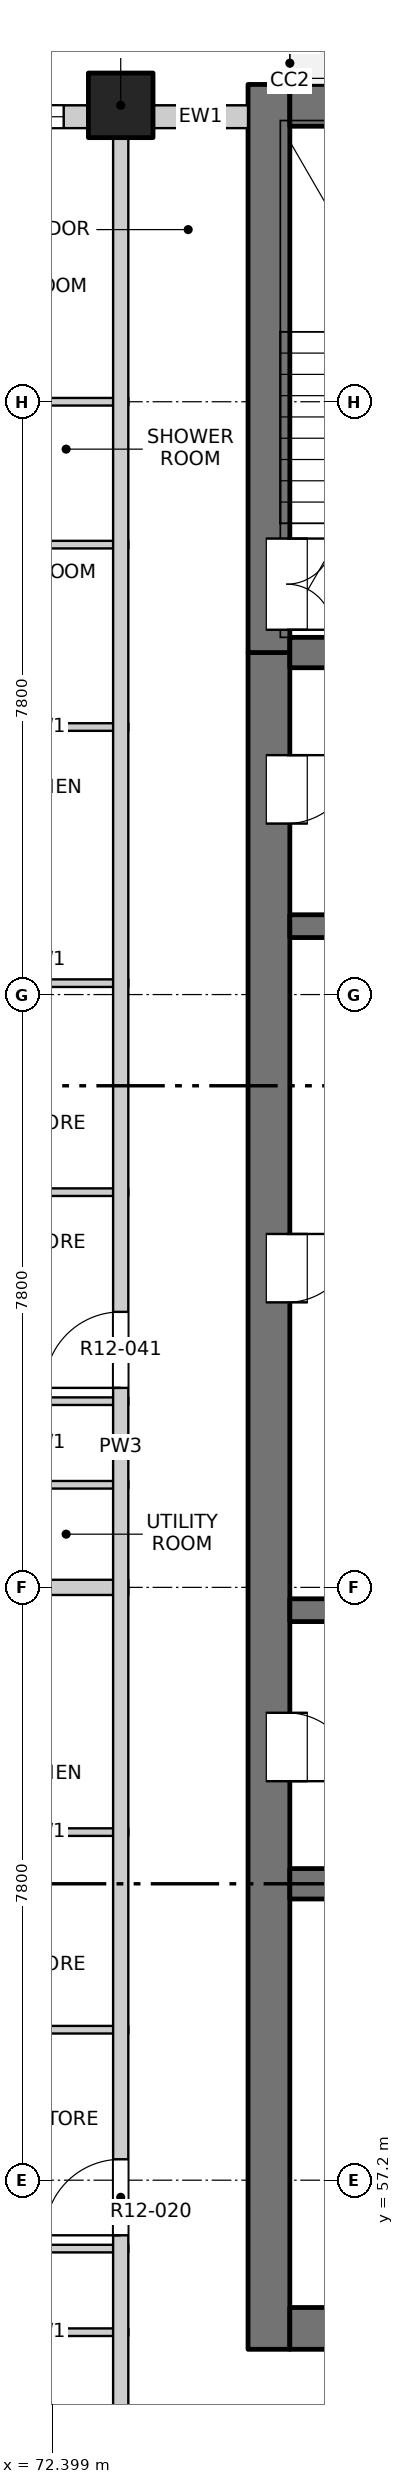
"""IFC4 building model, lengths in metres.
Left out: names, types, materials, properties, quantities, classifications, styles, units other than length and angle.
Written with IfcOpenShell. Run it as: python <this file> out.ifc"""

import sys

from ifc_helpers import new_model, si_unit, direction, frame, frame_2d, origin, origin_2d, place, context, subcontext, project, spatial, rectangle, extrude, element, fill, save


model = new_model("IFC4")
c1 = context("Model", 3, precision=1e-05, world=origin(), true_north=direction((0.0, 1.0)))
c2 = subcontext(c1, "Body", "Model", "MODEL_VIEW")
j1 = project(units=[si_unit("LENGTHUNIT", "METRE"), si_unit("PLANEANGLEUNIT", "RADIAN")], contexts=[c1])
p1 = place(None, origin())
s1 = spatial("IfcSite", under=j1, at=p1, CompositionType="ELEMENT")
p2 = place(p1, origin())
s2 = spatial("IfcBuilding", under=s1, at=p2, CompositionType="ELEMENT")
p3 = place(p2, frame((0.0, 0.0, 137.3)))
s3 = spatial("IfcBuildingStorey", under=s2, at=p3, CompositionType="ELEMENT", Elevation=137.3)
p4 = place(p3, frame((73.3, 84.5, -0.25), z_axis=(0.0, 0.0, 1.0), x_axis=(1.0, 0.0, 0.0)))
e1 = element("IfcColumn", 1, at=p4, inside=s3, PredefinedType="COLUMN", context=c2, shape_type="SweptSolid", body=[
    extrude(rectangle(XDim=0.85, YDim=0.85, at=origin_2d()), origin(), (0.0, 0.0, 1.0), 3.4),
])
p5 = place(p3, frame((75.25, 54.975, -0.25), z_axis=(0.0, 0.0, 1.0), x_axis=(0.0, 1.0, 0.0)))
e2 = element("IfcWall", 2, at=p5, inside=s3, PredefinedType="SOLIDWALL", context=c2, shape_type="SweptSolid", body=[
    extrude(rectangle(XDim=22.325, YDim=0.55, at=frame_2d((11.163, 0.0))), origin(), (0.0, 0.0, 1.0), 3.4),
])
p6 = place(p5, frame((7.475, 0.0, 0.25)))
e3 = element("IfcOpeningElement", 3, at=p6, cuts=e2, PredefinedType="OPENING", context=c2, shape_type="SweptSolid", body=[
    extrude(rectangle(XDim=0.9, YDim=2.1, at=frame_2d((0.45, 1.05))), frame((0.0, 0.285, 0.0), z_axis=(0.0, -1.0, 0.0), x_axis=(1.0, 0.0, 0.0)), (0.0, 0.0, 1.0), 0.57),
])
p7 = place(p5, frame((13.775, 0.0, 0.25)))
e4 = element("IfcOpeningElement", 4, at=p7, cuts=e2, PredefinedType="OPENING", context=c2, shape_type="SweptSolid", body=[
    extrude(rectangle(XDim=0.9, YDim=2.1, at=frame_2d((0.45, 1.05))), frame((0.0, 0.285, 0.0), z_axis=(0.0, -1.0, 0.0), x_axis=(1.0, 0.0, 0.0)), (0.0, 0.0, 1.0), 0.57),
])
p8 = place(p5, frame((20.075, 0.0, 0.25)))
e5 = element("IfcOpeningElement", 5, at=p8, cuts=e2, PredefinedType="OPENING", context=c2, shape_type="SweptSolid", body=[
    extrude(rectangle(XDim=0.9, YDim=2.1, at=frame_2d((0.45, 1.05))), frame((0.0, 0.285, 0.0), z_axis=(0.0, -1.0, 0.0), x_axis=(1.0, 0.0, 0.0)), (0.0, 0.0, 1.0), 0.57),
])
p9 = place(p3, frame((75.25, 77.3, -0.25), z_axis=(0.0, 0.0, 1.0), x_axis=(0.0, 1.0, 0.0)))
e6 = element("IfcWall", 6, at=p9, inside=s3, PredefinedType="SOLIDWALL", context=c2, shape_type="SweptSolid", body=[
    extrude(rectangle(XDim=7.475, YDim=0.55, at=frame_2d((3.737, 0.0))), origin(), (0.0, 0.0, 1.0), 3.4),
])
p10 = place(p9, frame((0.3, 0.0, 0.25)))
e7 = element("IfcOpeningElement", 7, at=p10, cuts=e6, PredefinedType="OPENING", context=c2, shape_type="SweptSolid", body=[
    extrude(rectangle(XDim=1.2, YDim=2.1, at=frame_2d((0.6, 1.05))), frame((0.0, 0.285, 0.0), z_axis=(0.0, -1.0, 0.0), x_axis=(1.0, 0.0, 0.0)), (0.0, 0.0, 1.0), 0.57),
])
p11 = place(p3, frame((75.525, 55.25, -0.25), z_axis=(0.0, 0.0, 1.0), x_axis=(1.0, 0.0, 0.0)))
e8 = element("IfcWall", 8, at=p11, inside=s3, PredefinedType="SOLIDWALL", context=c2, shape_type="SweptSolid", body=[
    extrude(rectangle(XDim=18.95, YDim=0.55, at=frame_2d((9.475, 0.0))), origin(), (0.0, 0.0, 1.0), 3.4),
])
p12 = place(p11, frame((8.725, 0.0, 0.25)))
e9 = element("IfcOpeningElement", 9, at=p12, cuts=e8, PredefinedType="OPENING", context=c2, shape_type="SweptSolid", body=[
    extrude(rectangle(XDim=1.5, YDim=2.1, at=frame_2d((0.75, 1.05))), frame((0.0, 0.285, 0.0), z_axis=(0.0, -1.0, 0.0), x_axis=(1.0, 0.0, 0.0)), (0.0, 0.0, 1.0), 0.57),
])
p13 = place(p3, frame((75.525, 84.5, -0.25), z_axis=(0.0, 0.0, 1.0), x_axis=(1.0, 0.0, 0.0)))
e10 = element("IfcWall", 10, at=p13, inside=s3, PredefinedType="SOLIDWALL", context=c2, shape_type="SweptSolid", body=[
    extrude(rectangle(XDim=18.95, YDim=0.55, at=frame_2d((9.475, 0.0))), origin(), (0.0, 0.0, 1.0), 3.4),
])
p14 = place(p3, frame((75.525, 61.1, -0.25), z_axis=(0.0, 0.0, 1.0), x_axis=(1.0, 0.0, 0.0)))
e11 = element("IfcWall", 11, at=p14, inside=s3, PredefinedType="SOLIDWALL", context=c2, shape_type="SweptSolid", body=[
    extrude(rectangle(XDim=3.775, YDim=0.4, at=frame_2d((1.888, 0.0))), origin(), (0.0, 0.0, 1.0), 3.4),
])
for number, where, z_axis, x_axis in (
    (12, (75.525, 64.7, -0.25), (0.0, 0.0, 1.0), (1.0, 0.0, 0.0)),
    (13, (75.525, 73.7, -0.25), (0.0, 0.0, 1.0), (1.0, 0.0, 0.0)),
):
    element("IfcWall", number, at=place(p3, frame(where, z_axis=z_axis, x_axis=x_axis)), inside=s3, PredefinedType="SOLIDWALL", context=c2, shape_type="SweptSolid", body=[
        extrude(rectangle(XDim=3.775, YDim=0.3, at=frame_2d((1.888, 0.0))), origin(), (0.0, 0.0, 1.0), 3.4),
    ])
p15 = place(p3, frame((75.525, 77.3, -0.25), z_axis=(0.0, 0.0, 1.0), x_axis=(1.0, 0.0, 0.0)))
e14 = element("IfcWall", 14, at=p15, inside=s3, PredefinedType="SOLIDWALL", context=c2, shape_type="SweptSolid", body=[
    extrude(rectangle(XDim=3.775, YDim=0.4, at=frame_2d((1.888, 0.0))), origin(), (0.0, 0.0, 1.0), 3.4),
])
p16 = place(p3, frame((69.4, 84.35, 0.0), z_axis=(0.0, 0.0, 1.0), x_axis=(1.0, 0.0, 0.0)))
e15 = element("IfcWall", 15, at=p16, inside=s3, PredefinedType="SOLIDWALL", context=c2, shape_type="SweptSolid", body=[
    extrude(rectangle(XDim=3.475, YDim=0.3, at=frame_2d((1.738, 0.0))), origin(), (0.0, 0.0, 1.0), 2.7),
])
p17 = place(p16, frame((0.75, 0.0, 0.9)))
e16 = element("IfcOpeningElement", 16, at=p17, cuts=e15, PredefinedType="OPENING", context=c2, shape_type="SweptSolid", body=[
    extrude(rectangle(XDim=2.4, YDim=1.8, at=frame_2d((1.2, 0.9))), frame((0.0, 0.16, 0.0), z_axis=(0.0, -1.0, 0.0), x_axis=(1.0, 0.0, 0.0)), (0.0, 0.0, 1.0), 0.32),
])
p18 = place(p3, frame((73.725, 84.35, 0.0), z_axis=(0.0, 0.0, 1.0), x_axis=(1.0, 0.0, 0.0)))
e17 = element("IfcWall", 17, at=p18, inside=s3, PredefinedType="SOLIDWALL", context=c2, shape_type="SweptSolid", body=[
    extrude(rectangle(XDim=1.25, YDim=0.3, at=frame_2d((0.625, 0.0))), origin(), (0.0, 0.0, 1.0), 2.7),
])
for number, where, z_axis, x_axis in (
    (18, (71.18, 55.2, 0.0), (0.0, 0.0, 1.0), (1.0, 0.0, 0.0)),
    (19, (71.18, 56.3, 0.0), (0.0, 0.0, 1.0), (1.0, 0.0, 0.0)),
    (20, (71.18, 59.18, 0.0), (0.0, 0.0, 1.0), (1.0, 0.0, 0.0)),
    (21, (71.18, 61.78, 0.0), (0.0, 0.0, 1.0), (1.0, 0.0, 0.0)),
):
    element("IfcWall", number, at=place(p3, frame(where, z_axis=z_axis, x_axis=x_axis)), inside=s3, PredefinedType="PARTITIONING", context=c2, shape_type="SweptSolid", body=[
        extrude(rectangle(XDim=2.22, YDim=0.1, at=frame_2d((1.11, 0.0))), origin(), (0.0, 0.0, 1.0), 3.15),
    ])
p19 = place(p3, frame((65.8, 65.0, 0.0), z_axis=(0.0, 0.0, 1.0), x_axis=(1.0, 0.0, 0.0)))
e22 = element("IfcWall", 22, at=p19, inside=s3, PredefinedType="PARTITIONING", context=c2, shape_type="SweptSolid", body=[
    extrude(rectangle(XDim=7.6, YDim=0.2, at=frame_2d((3.8, 0.0))), origin(), (0.0, 0.0, 1.0), 3.15),
])
for number, where, z_axis, x_axis in (
    (23, (71.18, 66.35, 0.0), (0.0, 0.0, 1.0), (1.0, 0.0, 0.0)),
    (24, (71.18, 67.45, 0.0), (0.0, 0.0, 1.0), (1.0, 0.0, 0.0)),
    (25, (71.18, 70.2, 0.0), (0.0, 0.0, 1.0), (1.0, 0.0, 0.0)),
    (26, (71.18, 72.95, 0.0), (0.0, 0.0, 1.0), (1.0, 0.0, 0.0)),
    (27, (71.18, 76.32, 0.0), (0.0, 0.0, 1.0), (1.0, 0.0, 0.0)),
    (28, (71.18, 78.72, 0.0), (0.0, 0.0, 1.0), (1.0, 0.0, 0.0)),
):
    element("IfcWall", number, at=place(p3, frame(where, z_axis=z_axis, x_axis=x_axis)), inside=s3, PredefinedType="PARTITIONING", context=c2, shape_type="SweptSolid", body=[
        extrude(rectangle(XDim=2.22, YDim=0.1, at=frame_2d((1.11, 0.0))), origin(), (0.0, 0.0, 1.0), 3.15),
    ])
p20 = place(p3, frame((65.8, 80.6, 0.0), z_axis=(0.0, 0.0, 1.0), x_axis=(1.0, 0.0, 0.0)))
e29 = element("IfcWall", 29, at=p20, inside=s3, PredefinedType="PARTITIONING", context=c2, shape_type="SweptSolid", body=[
    extrude(rectangle(XDim=7.6, YDim=0.1, at=frame_2d((3.8, 0.0))), origin(), (0.0, 0.0, 1.0), 3.15),
])
p21 = place(p20, frame((4.19, 0.0, 0.0)))
e30 = element("IfcOpeningElement", 30, at=p21, cuts=e29, PredefinedType="OPENING", context=c2, shape_type="SweptSolid", body=[
    extrude(rectangle(XDim=0.9, YDim=2.1, at=frame_2d((0.45, 1.05))), frame((0.0, 0.06, 0.0), z_axis=(0.0, -1.0, 0.0), x_axis=(1.0, 0.0, 0.0)), (0.0, 0.0, 1.0), 0.12),
])
p22 = place(p3, frame((73.3, 49.5, 0.0), z_axis=(0.0, 0.0, 1.0), x_axis=(0.0, 1.0, 0.0)))
e31 = element("IfcWall", 31, at=p22, inside=s3, PredefinedType="PARTITIONING", context=c2, shape_type="SweptSolid", body=[
    extrude(rectangle(XDim=34.7, YDim=0.2, at=frame_2d((17.35, 0.0))), origin(), (0.0, 0.0, 1.0), 3.15),
])
p23 = place(p22, frame((6.975, 0.0, 0.0)))
e32 = element("IfcOpeningElement", 32, at=p23, cuts=e31, PredefinedType="OPENING", context=c2, shape_type="SweptSolid", body=[
    extrude(rectangle(XDim=1.0, YDim=2.1, at=frame_2d((0.5, 1.05))), frame((0.0, 0.11, 0.0), z_axis=(0.0, -1.0, 0.0), x_axis=(1.0, 0.0, 0.0)), (0.0, 0.0, 1.0), 0.22),
])
p24 = place(p22, frame((18.125, 0.0, 0.0)))
e33 = element("IfcOpeningElement", 33, at=p24, cuts=e31, PredefinedType="OPENING", context=c2, shape_type="SweptSolid", body=[
    extrude(rectangle(XDim=1.0, YDim=2.1, at=frame_2d((0.5, 1.05))), frame((0.0, 0.11, 0.0), z_axis=(0.0, -1.0, 0.0), x_axis=(1.0, 0.0, 0.0)), (0.0, 0.0, 1.0), 0.22),
])
p25 = place(p17, origin())
e34 = element("IfcWindow", 34, at=p25, inside=s3, PartitioningType="DOUBLE_PANEL_VERTICAL", PredefinedType="WINDOW", context=c2, shape_type="SweptSolid", body=[
    extrude(rectangle(XDim=2.4, YDim=1.8, at=frame_2d((1.2, 0.9))), frame((0.0, 0.03, 0.0), z_axis=(0.0, -1.0, 0.0), x_axis=(1.0, 0.0, 0.0)), (0.0, 0.0, 1.0), 0.06),
])
fill(e16, e34)
p26 = place(p23, origin())
e35 = element("IfcDoor", 35, at=p26, inside=s3, OperationType="SINGLE_SWING_RIGHT", PredefinedType="DOOR", context=c2, shape_type="SweptSolid", body=[
    extrude(rectangle(XDim=1.0, YDim=2.1, at=frame_2d((0.5, 1.05))), frame((0.0, 0.025, 0.0), z_axis=(0.0, -1.0, 0.0), x_axis=(1.0, 0.0, 0.0)), (0.0, 0.0, 1.0), 0.05),
])
fill(e32, e35)
p27 = place(p6, origin())
e36 = element("IfcDoor", 36, at=p27, inside=s3, OperationType="SINGLE_SWING_RIGHT", PredefinedType="DOOR", context=c2, shape_type="SweptSolid", body=[
    extrude(rectangle(XDim=0.9, YDim=2.1, at=frame_2d((0.45, 1.05))), frame((0.0, -0.21, 0.0), z_axis=(0.0, -1.0, 0.0), x_axis=(1.0, 0.0, 0.0)), (0.0, 0.0, 1.0), 0.05),
])
fill(e3, e36)
p28 = place(p24, origin())
e37 = element("IfcDoor", 37, at=p28, inside=s3, OperationType="SINGLE_SWING_RIGHT", PredefinedType="DOOR", context=c2, shape_type="SweptSolid", body=[
    extrude(rectangle(XDim=1.0, YDim=2.1, at=frame_2d((0.5, 1.05))), frame((0.0, 0.025, 0.0), z_axis=(0.0, -1.0, 0.0), x_axis=(1.0, 0.0, 0.0)), (0.0, 0.0, 1.0), 0.05),
])
fill(e33, e37)
p29 = place(p7, origin())
e38 = element("IfcDoor", 38, at=p29, inside=s3, OperationType="SINGLE_SWING_LEFT", PredefinedType="DOOR", context=c2, shape_type="SweptSolid", body=[
    extrude(rectangle(XDim=0.9, YDim=2.1, at=frame_2d((0.45, 1.05))), frame((0.0, -0.21, 0.0), z_axis=(0.0, -1.0, 0.0), x_axis=(1.0, 0.0, 0.0)), (0.0, 0.0, 1.0), 0.05),
])
fill(e4, e38)
p30 = place(p8, origin())
e39 = element("IfcDoor", 39, at=p30, inside=s3, OperationType="SINGLE_SWING_LEFT", PredefinedType="DOOR", context=c2, shape_type="SweptSolid", body=[
    extrude(rectangle(XDim=0.9, YDim=2.1, at=frame_2d((0.45, 1.05))), frame((0.0, -0.21, 0.0), z_axis=(0.0, -1.0, 0.0), x_axis=(1.0, 0.0, 0.0)), (0.0, 0.0, 1.0), 0.05),
])
fill(e5, e39)
p31 = place(p10, origin())
e40 = element("IfcDoor", 40, at=p31, inside=s3, OperationType="DOUBLE_DOOR_SINGLE_SWING", PredefinedType="DOOR", context=c2, shape_type="SweptSolid", body=[
    extrude(rectangle(XDim=1.2, YDim=2.1, at=frame_2d((0.6, 1.05))), frame((0.0, -0.21, 0.0), z_axis=(0.0, -1.0, 0.0), x_axis=(1.0, 0.0, 0.0)), (0.0, 0.0, 1.0), 0.05),
])
fill(e7, e40)
save(model, sys.argv[1])
